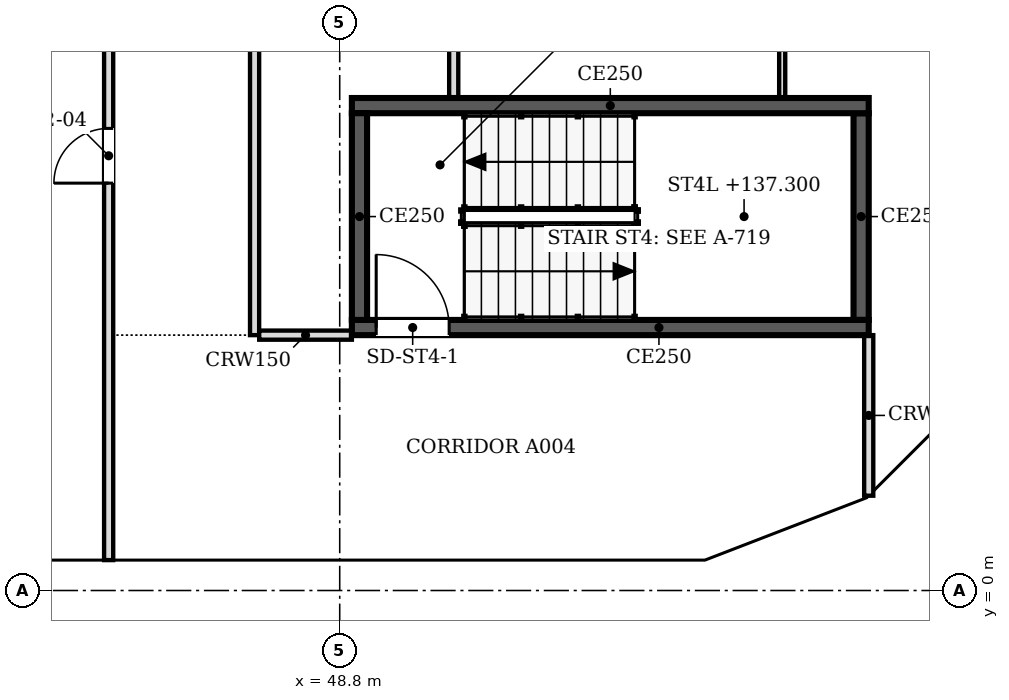
"""IFC4 building model, lengths in metres.
Left out: names, types, materials, properties, quantities, classifications, styles, units other than length and angle.
Written with IfcOpenShell. Run it as: python <this file> out.ifc"""

import sys

from ifc_helpers import new_model, si_unit, direction, frame, frame_2d, origin, place, context, subcontext, project, spatial, polyline, rectangle, outline, extrude, faceted_brep, source, transform, mapped, element, fill, save


model = new_model("IFC4")
c1 = context("Model", 3, precision=1e-05, world=origin(), true_north=direction((0.0, 1.0)))
c2 = subcontext(c1, "Body", "Model", "MODEL_VIEW")
j1 = project(units=[si_unit("LENGTHUNIT", "METRE"), si_unit("PLANEANGLEUNIT", "RADIAN")], contexts=[c1])
p1 = place(None, origin())
s1 = spatial("IfcSite", under=j1, at=p1, CompositionType="ELEMENT")
p2 = place(p1, origin())
s2 = spatial("IfcBuilding", under=s1, at=p2, CompositionType="ELEMENT")
p3 = place(p2, frame((0.0, 0.0, 135.4)))
s3 = spatial("IfcBuildingStorey", under=s2, at=p3, CompositionType="ELEMENT", Elevation=135.4)
m1 = source(origin(), c2, "Body", "SweptSolid", [
    extrude(outline(polyline([(3.05, 0.0), (6.1, 3.8), (3.05, 7.6), (0.0, 3.8), (3.05, 0.0)])), frame((0.0, 0.25, 0.0), z_axis=(0.0, -1.0, 0.0), x_axis=(1.0, 0.0, 0.0)), (0.0, 0.0, 1.0), 0.5),
])
p4 = place(p3, frame((39.65, 0.25, -3.8), z_axis=(0.0, 0.0, 1.0), x_axis=(1.0, 0.0, 0.0)))
e1 = element("IfcWall", 1, at=p4, inside=s3, PredefinedType="SOLIDWALL", context=c2, shape_type="MappedRepresentation", body=[
    mapped(m1, transform((0.0, 0.0, 0.0), scale=1.0)),
])
m2 = source(origin(), c2, "Body", "SweptSolid", [
    extrude(outline(polyline([(3.05, 0.399), (5.78, 3.8), (3.05, 7.2), (0.321, 3.8), (3.05, 0.399)])), frame((0.0, 0.26, 0.0), z_axis=(0.0, -1.0, 0.0), x_axis=(1.0, 0.0, 0.0)), (0.0, 0.0, 1.0), 0.52),
])
p5 = place(p4, origin())
e2 = element("IfcOpeningElement", 2, at=p5, cuts=e1, PredefinedType="OPENING", context=c2, shape_type="MappedRepresentation", body=[
    mapped(m2, transform((0.0, 0.0, 0.0), scale=1.0)),
])
p6 = place(p3, frame((45.75, 0.25, -3.8), z_axis=(0.0, 0.0, 1.0), x_axis=(1.0, 0.0, 0.0)))
e3 = element("IfcWall", 3, at=p6, inside=s3, PredefinedType="SOLIDWALL", context=c2, shape_type="MappedRepresentation", body=[
    mapped(m1, transform((0.0, 0.0, 0.0), scale=1.0)),
])
p7 = place(p6, origin())
e4 = element("IfcOpeningElement", 4, at=p7, cuts=e3, PredefinedType="OPENING", context=c2, shape_type="MappedRepresentation", body=[
    mapped(m2, transform((0.0, 0.0, 0.0), scale=1.0)),
])
m3 = source(origin(), c2, "Body", "Brep", [
    faceted_brep([(3.003, -0.25, 0.0), (3.05, -0.25, 0.06), (3.05, -0.25, 7.54), (3.003, -0.25, 7.6), (0.0, -0.25, 3.8), (0.0, 0.25, 3.8), (2.957, 0.25, 7.541), (2.957, 0.25, 0.059), (3.003, 0.0, 0.0), (3.003, 0.0, 7.6)], [[[0, 1, 2, 3, 4]], [[5, 6, 7]], [[1, 0, 8]], [[9, 3, 2]], [[6, 5, 4, 3, 9]], [[5, 7, 8, 0, 4]], [[1, 8, 7, 6, 9, 2]]]),
])
p8 = place(p3, frame((51.85, 0.25, -3.8), z_axis=(0.0, 0.0, 1.0), x_axis=(1.0, 0.0, 0.0)))
e5 = element("IfcWall", 5, at=p8, inside=s3, PredefinedType="SOLIDWALL", context=c2, shape_type="MappedRepresentation", body=[
    mapped(m3, transform((0.0, 0.0, 0.0), scale=1.0)),
])
m4 = source(origin(), c2, "Body", "SweptSolid", [
    extrude(outline(polyline([(2.803, 6.944), (0.319, 3.8), (2.803, 0.656), (2.803, 6.944)])), frame((0.0, 0.26, 0.0), z_axis=(0.0, -1.0, 0.0), x_axis=(1.0, 0.0, 0.0)), (0.0, 0.0, 1.0), 0.52),
])
p9 = place(p8, origin())
e6 = element("IfcOpeningElement", 6, at=p9, cuts=e5, PredefinedType="OPENING", context=c2, shape_type="MappedRepresentation", body=[
    mapped(m4, transform((0.0, 0.0, 0.0), scale=1.0)),
])
m5 = source(origin(), c2, "Body", "Brep", [
    faceted_brep([(0.047, -0.25, 0.0), (2.997, -0.25, 3.8), (0.047, -0.25, 7.6), (0.0, -0.25, 7.541), (0.0, -0.25, 0.059), (0.093, 0.25, 7.54), (2.944, 0.25, 3.868), (2.944, 0.25, 3.732), (0.093, 0.25, 0.06), (2.997, 0.0, 3.8), (0.047, 0.0, 0.0), (0.047, 0.0, 7.6)], [[[0, 1, 2, 3, 4]], [[5, 6, 7, 8]], [[8, 7, 9, 1, 0, 10]], [[6, 5, 11, 2, 1, 9]], [[3, 2, 11]], [[10, 0, 4]], [[8, 10, 4, 3, 11, 5]], [[9, 7, 6]]]),
])
p10 = place(p3, frame((54.81, 0.233, -3.8), z_axis=(0.0, 0.0, 1.0), x_axis=(0.932990326376, 0.359901446078, 0.0)))
e7 = element("IfcWall", 7, at=p10, inside=s3, PredefinedType="SOLIDWALL", context=c2, shape_type="MappedRepresentation", body=[
    mapped(m5, transform((0.0, 0.0, 0.0), scale=1.0)),
])
m6 = source(origin(), c2, "Body", "SweptSolid", [
    extrude(outline(polyline([(0.247, 0.665), (2.681, 3.8), (0.247, 6.935), (0.247, 0.665)])), frame((0.0, 0.26, 0.0), z_axis=(0.0, -1.0, 0.0), x_axis=(1.0, 0.0, 0.0)), (0.0, 0.0, 1.0), 0.52),
])
p11 = place(p10, origin())
e8 = element("IfcOpeningElement", 8, at=p11, cuts=e7, PredefinedType="OPENING", context=c2, shape_type="MappedRepresentation", body=[
    mapped(m6, transform((0.0, 0.0, 0.0), scale=1.0)),
])
m7 = source(origin(), c2, "Body", "Brep", [
    faceted_brep([(2.944, -0.25, 0.0), (2.997, -0.25, 0.068), (2.997, -0.25, 7.532), (2.944, -0.25, 7.6), (0.0, -0.25, 3.8), (0.053, 0.25, 3.868), (2.891, 0.25, 7.532), (2.891, 0.25, 0.068), (0.053, 0.25, 3.731), (2.944, 0.0, 0.0), (2.944, 0.0, 7.6), (0.0, 0.0, 3.8)], [[[0, 1, 2, 3, 4]], [[5, 6, 7, 8]], [[1, 0, 9]], [[10, 3, 2]], [[6, 5, 11, 4, 3, 10]], [[8, 7, 9, 0, 4, 11]], [[8, 11, 5]], [[1, 9, 7, 6, 10, 2]]]),
])
p12 = place(p3, frame((57.606, 1.312, -3.8), z_axis=(0.0, 0.0, 1.0), x_axis=(0.707147509625, 0.707066050402, 0.0)))
e9 = element("IfcWall", 9, at=p12, inside=s3, PredefinedType="SOLIDWALL", context=c2, shape_type="MappedRepresentation", body=[
    mapped(m7, transform((0.0, 0.0, 0.0), scale=1.0)),
])
m8 = source(origin(), c2, "Body", "SweptSolid", [
    extrude(outline(polyline([(2.744, 6.934), (0.316, 3.8), (2.744, 0.666), (2.744, 6.934)])), frame((0.0, 0.26, 0.0), z_axis=(0.0, -1.0, 0.0), x_axis=(1.0, 0.0, 0.0)), (0.0, 0.0, 1.0), 0.52),
])
p13 = place(p12, origin())
e10 = element("IfcOpeningElement", 10, at=p13, cuts=e9, PredefinedType="OPENING", context=c2, shape_type="MappedRepresentation", body=[
    mapped(m8, transform((0.0, 0.0, 0.0), scale=1.0)),
])
p14 = place(p2, frame((0.0, 0.0, 139.2)))
s4 = spatial("IfcBuildingStorey", under=s2, at=p14, CompositionType="ELEMENT", Elevation=139.2)
m9 = source(origin(), c2, "Body", "SweptSolid", [
    extrude(outline(polyline([(3.05, 0.0), (6.1, 3.8), (3.05, 7.6), (0.0, 3.8), (3.05, 0.0)])), frame((0.0, 0.25, 0.0), z_axis=(0.0, -1.0, 0.0), x_axis=(1.0, 0.0, 0.0)), (0.0, 0.0, 1.0), 0.5),
])
p15 = place(p14, frame((42.7, 0.25, -3.8), z_axis=(0.0, 0.0, 1.0), x_axis=(1.0, 0.0, 0.0)))
e11 = element("IfcWall", 11, at=p15, inside=s4, PredefinedType="SOLIDWALL", context=c2, shape_type="MappedRepresentation", body=[
    mapped(m9, transform((0.0, 0.0, 0.0), scale=1.0)),
])
m10 = source(origin(), c2, "Body", "SweptSolid", [
    extrude(outline(polyline([(3.05, 0.399), (5.78, 3.8), (3.05, 7.201), (0.321, 3.8), (3.05, 0.399)])), frame((0.0, 0.26, 0.0), z_axis=(0.0, -1.0, 0.0), x_axis=(1.0, 0.0, 0.0)), (0.0, 0.0, 1.0), 0.52),
])
p16 = place(p15, origin())
e12 = element("IfcOpeningElement", 12, at=p16, cuts=e11, PredefinedType="OPENING", context=c2, shape_type="MappedRepresentation", body=[
    mapped(m10, transform((0.0, 0.0, 0.0), scale=1.0)),
])
m11 = source(origin(), c2, "Body", "Brep", [
    faceted_brep([(3.05, -0.25, 0.0), (6.053, -0.25, 3.8), (3.05, -0.25, 7.6), (0.0, -0.25, 3.8), (0.0, 0.25, 3.8), (3.05, 0.25, 7.6), (6.007, 0.25, 3.859), (6.007, 0.25, 3.741), (3.05, 0.25, 0.0), (6.053, 0.0, 3.8)], [[[0, 1, 2, 3]], [[4, 5, 6, 7, 8]], [[8, 7, 9, 1, 0]], [[6, 5, 2, 1, 9]], [[5, 4, 3, 2]], [[4, 8, 0, 3]], [[9, 7, 6]]]),
])
p17 = place(p14, frame((48.8, 0.25, -3.8), z_axis=(0.0, 0.0, 1.0), x_axis=(1.0, 0.0, 0.0)))
e13 = element("IfcWall", 13, at=p17, inside=s4, PredefinedType="SOLIDWALL", context=c2, shape_type="MappedRepresentation", body=[
    mapped(m11, transform((0.0, 0.0, 0.0), scale=1.0)),
])
m12 = source(origin(), c2, "Body", "SweptSolid", [
    extrude(outline(polyline([(3.049, 0.401), (5.735, 3.8), (3.049, 7.199), (0.321, 3.8), (3.049, 0.401)])), frame((0.0, 0.26, 0.0), z_axis=(0.0, -1.0, 0.0), x_axis=(1.0, 0.0, 0.0)), (0.0, 0.0, 1.0), 0.52),
])
p18 = place(p17, origin())
e14 = element("IfcOpeningElement", 14, at=p18, cuts=e13, PredefinedType="OPENING", context=c2, shape_type="MappedRepresentation", body=[
    mapped(m12, transform((0.0, 0.0, 0.0), scale=1.0)),
])
m13 = source(origin(), c2, "Body", "Brep", [
    faceted_brep([(2.95, -0.25, 0.0), (3.003, -0.25, 0.068), (3.003, -0.25, 7.532), (2.95, -0.25, 7.6), (0.0, -0.25, 3.8), (0.047, 0.25, 3.86), (2.898, 0.25, 7.532), (2.898, 0.25, 0.068), (0.047, 0.25, 3.74), (2.95, 0.0, 0.0), (2.95, 0.0, 7.6), (0.0, 0.0, 3.8)], [[[0, 1, 2, 3, 4]], [[5, 6, 7, 8]], [[1, 0, 9]], [[10, 3, 2]], [[6, 5, 11, 4, 3, 10]], [[8, 7, 9, 0, 4, 11]], [[8, 11, 5]], [[1, 9, 7, 6, 10, 2]]]),
])
p19 = place(p14, frame((54.854, 0.25, -3.8), z_axis=(0.0, 0.0, 1.0), x_axis=(0.932970071518, 0.359953949349, 0.0)))
e15 = element("IfcWall", 15, at=p19, inside=s4, PredefinedType="SOLIDWALL", context=c2, shape_type="MappedRepresentation", body=[
    mapped(m13, transform((0.0, 0.0, 0.0), scale=1.0)),
])
m14 = source(origin(), c2, "Body", "SweptSolid", [
    extrude(outline(polyline([(2.75, 6.935), (0.316, 3.8), (2.75, 0.665), (2.75, 6.935)])), frame((0.0, 0.26, 0.0), z_axis=(0.0, -1.0, 0.0), x_axis=(1.0, 0.0, 0.0)), (0.0, 0.0, 1.0), 0.52),
])
p20 = place(p19, origin())
e16 = element("IfcOpeningElement", 16, at=p20, cuts=e15, PredefinedType="OPENING", context=c2, shape_type="MappedRepresentation", body=[
    mapped(m14, transform((0.0, 0.0, 0.0), scale=1.0)),
])
m15 = source(origin(), c2, "Body", "Brep", [
    faceted_brep([(0.053, -0.25, 0.0), (2.997, -0.25, 3.8), (0.053, -0.25, 7.6), (0.0, -0.25, 7.532), (0.0, -0.25, 0.068), (0.106, 0.25, 7.532), (2.944, 0.25, 3.868), (2.944, 0.25, 3.732), (0.106, 0.25, 0.068), (2.997, 0.0, 3.8), (0.053, 0.0, 0.0), (0.053, 0.0, 7.6)], [[[0, 1, 2, 3, 4]], [[5, 6, 7, 8]], [[8, 7, 9, 1, 0, 10]], [[6, 5, 11, 2, 1, 9]], [[3, 2, 11]], [[10, 0, 4]], [[8, 10, 4, 3, 11, 5]], [[9, 7, 6]]]),
])
p21 = place(p14, frame((57.569, 1.274, -3.8), z_axis=(0.0, 0.0, 1.0), x_axis=(0.707066050402, 0.707147509625, 0.0)))
e17 = element("IfcWall", 17, at=p21, inside=s4, PredefinedType="SOLIDWALL", context=c2, shape_type="MappedRepresentation", body=[
    mapped(m15, transform((0.0, 0.0, 0.0), scale=1.0)),
])
m16 = source(origin(), c2, "Body", "SweptSolid", [
    extrude(outline(polyline([(0.253, 0.667), (2.681, 3.8), (0.253, 6.934), (0.253, 0.667)])), frame((0.0, 0.26, 0.0), z_axis=(0.0, -1.0, 0.0), x_axis=(1.0, 0.0, 0.0)), (0.0, 0.0, 1.0), 0.52),
])
p22 = place(p21, origin())
e18 = element("IfcOpeningElement", 18, at=p22, cuts=e17, PredefinedType="OPENING", context=c2, shape_type="MappedRepresentation", body=[
    mapped(m16, transform((0.0, 0.0, 0.0), scale=1.0)),
])
p23 = place(p3, frame((57.5, 4.325, 0.0), z_axis=(0.0, 0.0, 1.0), x_axis=(-1.0, 0.0, 0.0)))
e19 = element("IfcWall", 19, at=p23, inside=s3, PredefinedType="SOLIDWALL", context=c2, shape_type="SweptSolid", body=[
    extrude(rectangle(XDim=8.5, YDim=0.25, at=frame_2d((4.25, 0.0))), origin(), (0.0, 0.0, 1.0), 3.8),
])
m17 = source(origin(), c2, "Body", "SweptSolid", [
    extrude(rectangle(XDim=1.2, YDim=2.1, at=frame_2d((0.6, 1.05))), frame((0.0, 0.135, 0.0), z_axis=(0.0, -1.0, 0.0), x_axis=(1.0, 0.0, 0.0)), (0.0, 0.0, 1.0), 0.27),
])
p24 = place(p23, frame((6.9, 0.0, 0.0)))
e20 = element("IfcOpeningElement", 20, at=p24, cuts=e19, PredefinedType="OPENING", context=c2, shape_type="MappedRepresentation", body=[
    mapped(m17, transform((0.0, 0.0, 0.0), scale=1.0)),
])
p25 = place(p3, frame((49.125, 4.45, 0.0), z_axis=(0.0, 0.0, 1.0), x_axis=(0.0, 1.0, 0.0)))
e21 = element("IfcWall", 21, at=p25, inside=s3, PredefinedType="SOLIDWALL", context=c2, shape_type="SweptSolid", body=[
    extrude(rectangle(XDim=3.4, YDim=0.25, at=frame_2d((1.7, 0.0))), origin(), (0.0, 0.0, 1.0), 3.8),
])
p26 = place(p3, frame((49.0, 7.975, 0.0), z_axis=(0.0, 0.0, 1.0), x_axis=(1.0, 0.0, 0.0)))
e22 = element("IfcWall", 22, at=p26, inside=s3, PredefinedType="SOLIDWALL", context=c2, shape_type="SweptSolid", body=[
    extrude(rectangle(XDim=8.5, YDim=0.25, at=frame_2d((4.25, 0.0))), origin(), (0.0, 0.0, 1.0), 3.8),
])
p27 = place(p3, frame((57.375, 7.85, 0.0), z_axis=(0.0, 0.0, 1.0), x_axis=(0.0, -1.0, 0.0)))
e23 = element("IfcWall", 23, at=p27, inside=s3, PredefinedType="SOLIDWALL", context=c2, shape_type="SweptSolid", body=[
    extrude(rectangle(XDim=3.4, YDim=0.25, at=frame_2d((1.7, 0.0))), origin(), (0.0, 0.0, 1.0), 3.8),
])
p28 = place(p3, frame((45.0, 0.5, 0.0), z_axis=(0.0, 0.0, 1.0), x_axis=(0.0, 1.0, 0.0)))
e24 = element("IfcWall", 24, at=p28, inside=s3, PredefinedType="PARTITIONING", context=c2, shape_type="SweptSolid", body=[
    extrude(rectangle(XDim=21.724, YDim=0.15, at=frame_2d((10.862, 0.0))), origin(), (0.0, 0.0, 1.0), 3.067),
])
m18 = source(origin(), c2, "Body", "SweptSolid", [
    extrude(rectangle(XDim=0.9, YDim=2.1, at=frame_2d((0.45, 1.05))), frame((0.0, 0.085, 0.0), z_axis=(0.0, -1.0, 0.0), x_axis=(1.0, 0.0, 0.0)), (0.0, 0.0, 1.0), 0.17),
])
p29 = place(p28, frame((6.2, 0.0, 0.0)))
e25 = element("IfcOpeningElement", 25, at=p29, cuts=e24, PredefinedType="OPENING", context=c2, shape_type="MappedRepresentation", body=[
    mapped(m18, transform((0.0, 0.0, 0.0), scale=1.0)),
])
p30 = place(p28, frame((15.3, 0.0, 0.0)))
e26 = element("IfcOpeningElement", 26, at=p30, cuts=e24, PredefinedType="OPENING", context=c2, shape_type="MappedRepresentation", body=[
    mapped(m18, transform((0.0, 0.0, 0.0), scale=1.0)),
])
p31 = place(p3, frame((57.5, 1.559, 0.0), z_axis=(0.0, 0.0, 1.0), x_axis=(0.0, 1.0, 0.0)))
e27 = element("IfcWall", 27, at=p31, inside=s3, PredefinedType="PARTITIONING", context=c2, shape_type="SweptSolid", body=[
    extrude(rectangle(XDim=2.641, YDim=0.15, at=frame_2d((1.32, 0.0))), origin(), (0.0, 0.0, 1.0), 3.067),
])
p32 = place(p3, frame((47.4, 22.3, 0.0), z_axis=(0.0, 0.0, 1.0), x_axis=(0.0, -1.0, 0.0)))
e28 = element("IfcWall", 28, at=p32, inside=s3, PredefinedType="PARTITIONING", context=c2, shape_type="SweptSolid", body=[
    extrude(rectangle(XDim=18.1, YDim=0.15, at=frame_2d((9.05, 0.0))), origin(), (0.0, 0.0, 1.0), 3.067),
])
m19 = source(origin(), c2, "Body", "SweptSolid", [
    extrude(rectangle(XDim=1.0, YDim=2.1, at=frame_2d((0.5, 1.05))), frame((0.0, 0.085, 0.0), z_axis=(0.0, -1.0, 0.0), x_axis=(1.0, 0.0, 0.0)), (0.0, 0.0, 1.0), 0.17),
])
p33 = place(p32, frame((2.099, 0.0, 0.0)))
e29 = element("IfcOpeningElement", 29, at=p33, cuts=e28, PredefinedType="OPENING", context=c2, shape_type="MappedRepresentation", body=[
    mapped(m19, transform((0.0, 0.0, 0.0), scale=1.0)),
])
p34 = place(p32, frame((11.2, 0.0, 0.0)))
e30 = element("IfcOpeningElement", 30, at=p34, cuts=e28, PredefinedType="OPENING", context=c2, shape_type="MappedRepresentation", body=[
    mapped(m19, transform((0.0, 0.0, 0.0), scale=1.0)),
])
p35 = place(p3, frame((47.476, 4.2, 0.0), z_axis=(0.0, 0.0, 1.0), x_axis=(1.0, 0.0, 0.0)))
e31 = element("IfcWall", 31, at=p35, inside=s3, PredefinedType="PARTITIONING", context=c2, shape_type="SweptSolid", body=[
    extrude(rectangle(XDim=1.524, YDim=0.15, at=frame_2d((0.762, 0.0))), origin(), (0.0, 0.0, 1.0), 3.067),
])
p36 = place(p3, frame((50.675, 17.1, 0.0), z_axis=(0.0, 0.0, 1.0), x_axis=(0.0, -1.0, 0.0)))
e32 = element("IfcWall", 32, at=p36, inside=s3, PredefinedType="PARTITIONING", context=c2, shape_type="SweptSolid", body=[
    extrude(rectangle(XDim=9.0, YDim=0.15, at=frame_2d((4.5, 0.0))), origin(), (0.0, 0.0, 1.0), 3.067),
])
p37 = place(p36, frame((4.1, 0.0, 0.0)))
e33 = element("IfcOpeningElement", 33, at=p37, cuts=e32, PredefinedType="OPENING", context=c2, shape_type="MappedRepresentation", body=[
    mapped(m18, transform((0.0, 0.0, 0.0), scale=1.0)),
])
p38 = place(p3, frame((56.077, 17.024, 0.0), z_axis=(0.0, 0.0, 1.0), x_axis=(0.0, -1.0, 0.0)))
e34 = element("IfcWall", 34, at=p38, inside=s3, PredefinedType="PARTITIONING", context=c2, shape_type="SweptSolid", body=[
    extrude(rectangle(XDim=8.924, YDim=0.1, at=frame_2d((4.462, 0.0))), origin(), (0.0, 0.0, 1.0), 3.067),
])
m20 = source(origin(), c2, "Body", "SweptSolid", [
    extrude(rectangle(XDim=0.9, YDim=2.1, at=frame_2d((0.45, 1.05))), frame((0.0, 0.06, 0.0), z_axis=(0.0, -1.0, 0.0), x_axis=(1.0, 0.0, 0.0)), (0.0, 0.0, 1.0), 0.12),
])
p39 = place(p38, frame((1.608, 0.0, 0.0)))
e35 = element("IfcOpeningElement", 35, at=p39, cuts=e34, PredefinedType="OPENING", context=c2, shape_type="MappedRepresentation", body=[
    mapped(m20, transform((0.0, 0.0, 0.0), scale=1.0)),
])
p40 = place(p38, frame((6.024, 0.0, 0.0)))
e36 = element("IfcOpeningElement", 36, at=p40, cuts=e34, PredefinedType="OPENING", context=c2, shape_type="MappedRepresentation", body=[
    mapped(m20, transform((0.0, 0.0, 0.0), scale=1.0)),
])
m21 = source(origin(), c2, "Body", "SweptSolid", [
    extrude(rectangle(XDim=1.2, YDim=2.1, at=frame_2d((0.6, 1.05))), frame((0.0, 0.025, 0.0), z_axis=(0.0, -1.0, 0.0), x_axis=(1.0, 0.0, 0.0)), (0.0, 0.0, 1.0), 0.05),
])
p41 = place(p24, origin())
e37 = element("IfcDoor", 37, at=p41, inside=s3, OperationType="SINGLE_SWING_RIGHT", PredefinedType="DOOR", context=c2, shape_type="MappedRepresentation", body=[
    mapped(m21, transform((0.0, 0.0, 0.0), scale=1.0)),
])
fill(e20, e37)
m22 = source(origin(), c2, "Body", "SweptSolid", [
    extrude(rectangle(XDim=0.9, YDim=2.1, at=frame_2d((0.45, 1.05))), frame((0.0, 0.025, 0.0), z_axis=(0.0, -1.0, 0.0), x_axis=(1.0, 0.0, 0.0)), (0.0, 0.0, 1.0), 0.05),
])
p42 = place(p29, origin())
e38 = element("IfcDoor", 38, at=p42, inside=s3, OperationType="SINGLE_SWING_LEFT", PredefinedType="DOOR", context=c2, shape_type="MappedRepresentation", body=[
    mapped(m22, transform((0.0, 0.0, 0.0), scale=1.0)),
])
fill(e25, e38)
save(model, sys.argv[1])
